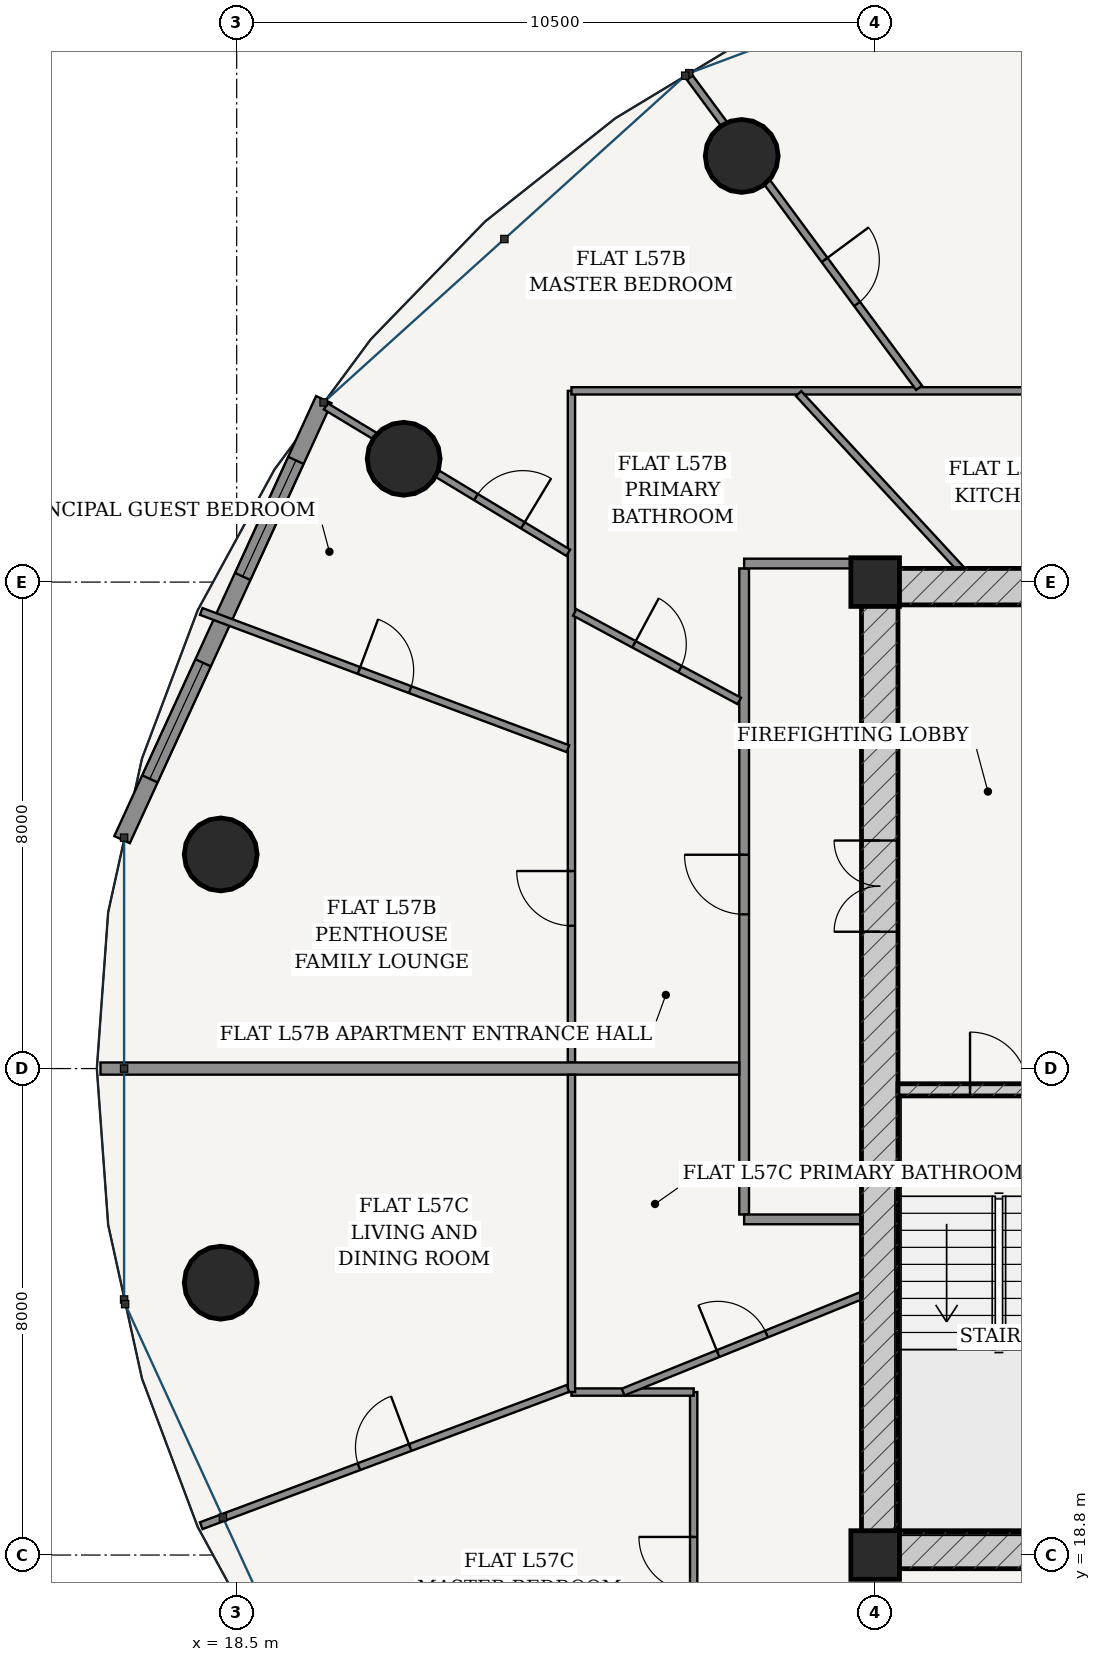
"""IFC4 building model, lengths in metres.
Left out: names, types, materials, properties, quantities, classifications, styles, units other than length and angle.
Written with IfcOpenShell. Run it as: python <this file> out.ifc"""

import sys

from ifc_helpers import new_model, si_unit, direction, frame, frame_2d, origin, origin_2d, place, context, subcontext, project, spatial, rectangle, hollow_circle, extrude, source, transform, mapped, element, fill, save


model = new_model("IFC4")
c1 = context("Model", 3, precision=1e-05, world=origin(), true_north=direction((-0.2419218956, 0.970295726276)))
c2 = subcontext(c1, "Body", "Model", "MODEL_VIEW")
j1 = project(units=[si_unit("LENGTHUNIT", "METRE"), si_unit("PLANEANGLEUNIT", "RADIAN")], contexts=[c1])
p1 = place(None, origin())
s1 = spatial("IfcSite", under=j1, at=p1, CompositionType="ELEMENT")
p2 = place(p1, origin())
s2 = spatial("IfcBuilding", under=s1, at=p2, CompositionType="ELEMENT")
p3 = place(p2, frame((0.0, 0.0, 217.1)))
s3 = spatial("IfcBuildingStorey", under=s2, at=p3, CompositionType="ELEMENT", Elevation=217.1)
for number, where, z_axis, x_axis in (
    (1, (29.0, 18.8, 0.0), (0.0, 0.0, 1.0), (1.0, 0.0, 0.0)),
    (2, (29.0, 34.8, 0.0), (0.0, 0.0, 1.0), (1.0, 0.0, 0.0)),
):
    element("IfcColumn", number, at=place(p3, frame(where, z_axis=z_axis, x_axis=x_axis)), inside=s3, PredefinedType="COLUMN", context=c2, shape_type="SweptSolid", body=[
        extrude(rectangle(XDim=0.8, YDim=0.8, at=origin_2d()), origin(), (0.0, 0.0, 1.0), 3.7),
    ])
p4 = place(p3, frame((28.775, 18.875, 0.0), z_axis=(0.0, 0.0, 1.0), x_axis=(1.0, 0.0, 0.0)))
e3 = element("IfcWall", 3, at=p4, inside=s3, PredefinedType="SHEAR", context=c2, shape_type="SweptSolid", body=[
    extrude(rectangle(XDim=18.45, YDim=0.6, at=frame_2d((9.225, 0.0))), origin(), (0.0, 0.0, 1.0), 3.435),
])
p5 = place(p4, frame((7.46, 0.0, 0.0)))
e4 = element("IfcOpeningElement", 4, at=p5, cuts=e3, PredefinedType="OPENING", context=c2, shape_type="SweptSolid", body=[
    extrude(rectangle(XDim=0.85, YDim=2.1, at=frame_2d((0.425, 1.05))), frame((0.0, 0.31, 0.0), z_axis=(0.0, -1.0, 0.0), x_axis=(1.0, 0.0, 0.0)), (0.0, 0.0, 1.0), 0.62),
])
p6 = place(p4, frame((10.54, 0.0, 0.0)))
e5 = element("IfcOpeningElement", 5, at=p6, cuts=e3, PredefinedType="OPENING", context=c2, shape_type="SweptSolid", body=[
    extrude(rectangle(XDim=0.85, YDim=2.1, at=frame_2d((0.425, 1.05))), frame((0.0, 0.31, 0.0), z_axis=(0.0, -1.0, 0.0), x_axis=(1.0, 0.0, 0.0)), (0.0, 0.0, 1.0), 0.62),
])
p7 = place(p3, frame((28.775, 34.725, 0.0), z_axis=(0.0, 0.0, 1.0), x_axis=(1.0, 0.0, 0.0)))
e6 = element("IfcWall", 6, at=p7, inside=s3, PredefinedType="SHEAR", context=c2, shape_type="SweptSolid", body=[
    extrude(rectangle(XDim=18.45, YDim=0.6, at=frame_2d((9.225, 0.0))), origin(), (0.0, 0.0, 1.0), 3.435),
])
p8 = place(p3, frame((29.075, 19.175, 0.0), z_axis=(0.0, 0.0, 1.0), x_axis=(0.0, 1.0, 0.0)))
e7 = element("IfcWall", 7, at=p8, inside=s3, PredefinedType="SHEAR", context=c2, shape_type="SweptSolid", body=[
    extrude(rectangle(XDim=15.25, YDim=0.6, at=frame_2d((7.625, 0.0))), origin(), (0.0, 0.0, 1.0), 3.435),
])
p9 = place(p8, frame((9.875, 0.0, 0.0)))
e8 = element("IfcOpeningElement", 8, at=p9, cuts=e7, PredefinedType="OPENING", context=c2, shape_type="SweptSolid", body=[
    extrude(rectangle(XDim=1.5, YDim=2.2, at=frame_2d((0.75, 1.1))), frame((0.0, 0.31, 0.0), z_axis=(0.0, -1.0, 0.0), x_axis=(1.0, 0.0, 0.0)), (0.0, 0.0, 1.0), 0.62),
])
p10 = place(p3, frame((29.375, 26.45, 0.0), z_axis=(0.0, 0.0, 1.0), x_axis=(1.0, 0.0, 0.0)))
e9 = element("IfcWall", 9, at=p10, inside=s3, PredefinedType="SOLIDWALL", context=c2, shape_type="SweptSolid", body=[
    extrude(rectangle(XDim=3.32, YDim=0.2, at=frame_2d((1.66, 0.0))), origin(), (0.0, 0.0, 1.0), 3.435),
])
p11 = place(p10, frame((1.185, 0.0, 0.0)))
e10 = element("IfcOpeningElement", 10, at=p11, cuts=e9, PredefinedType="OPENING", context=c2, shape_type="SweptSolid", body=[
    extrude(rectangle(XDim=0.95, YDim=2.15, at=frame_2d((0.475, 1.075))), frame((0.0, 0.11, 0.0), z_axis=(0.0, -1.0, 0.0), x_axis=(1.0, 0.0, 0.0)), (0.0, 0.0, 1.0), 0.22),
])
for number, where, z_axis, x_axis in (
    (11, (26.805, 41.808, 0.0), (0.0, 0.0, 1.0), (1.0, 0.0, 0.0)),
    (12, (21.246, 36.828, 0.0), (0.0, 0.0, 1.0), (1.0, 0.0, 0.0)),
    (13, (18.237, 30.321, 0.0), (0.0, 0.0, 1.0), (1.0, 0.0, 0.0)),
    (14, (18.237, 23.279, 0.0), (0.0, 0.0, 1.0), (1.0, 0.0, 0.0)),
):
    element("IfcColumn", number, at=place(p3, frame(where, z_axis=z_axis, x_axis=x_axis)), inside=s3, PredefinedType="COLUMN", context=c2, shape_type="SweptSolid", body=[
        extrude(hollow_circle(Radius=0.6, WallThickness=0.038, at=origin_2d()), origin(), (0.0, 0.0, 1.0), 3.7),
    ])
p12 = place(p3, frame((19.932, 37.801, 0.0), z_axis=(0.0, 0.0, 1.0), x_axis=(-0.416717018135, -0.909036262641, 0.0)))
e15 = element("IfcWall", 15, at=p12, inside=s3, PredefinedType="SOLIDWALL", context=c2, shape_type="SweptSolid", body=[
    extrude(rectangle(XDim=7.96, YDim=0.28, at=frame_2d((3.98, 0.0))), origin(), (0.0, 0.0, 1.0), 3.435),
])
p13 = place(p12, frame((1.099, 0.0, 0.85)))
e16 = element("IfcOpeningElement", 16, at=p13, cuts=e15, PredefinedType="OPENING", context=c2, shape_type="SweptSolid", body=[
    extrude(rectangle(XDim=2.1, YDim=1.95, at=frame_2d((1.05, 0.975))), frame((0.0, 0.15, 0.0), z_axis=(0.0, -1.0, 0.0), x_axis=(1.0, 0.0, 0.0)), (0.0, 0.0, 1.0), 0.3),
])
p14 = place(p12, frame((4.761, 0.0, 0.85)))
e17 = element("IfcOpeningElement", 17, at=p14, cuts=e15, PredefinedType="OPENING", context=c2, shape_type="SweptSolid", body=[
    extrude(rectangle(XDim=2.1, YDim=1.95, at=frame_2d((1.05, 0.975))), frame((0.0, 0.15, 0.0), z_axis=(0.0, -1.0, 0.0), x_axis=(1.0, 0.0, 0.0)), (0.0, 0.0, 1.0), 0.3),
])
p15 = place(p3, frame((26.845, 24.4, 0.0), z_axis=(0.0, 0.0, 1.0), x_axis=(0.0, 1.0, 0.0)))
e18 = element("IfcWall", 18, at=p15, inside=s3, PredefinedType="PARTITIONING", context=c2, shape_type="SweptSolid", body=[
    extrude(rectangle(XDim=10.625, YDim=0.16, at=frame_2d((5.312, 0.0))), origin(), (0.0, 0.0, 1.0), 2.951),
])
p16 = place(p15, frame((4.936, 0.0, 0.0)))
e19 = element("IfcOpeningElement", 19, at=p16, cuts=e18, PredefinedType="OPENING", context=c2, shape_type="SweptSolid", body=[
    extrude(rectangle(XDim=0.98, YDim=2.2, at=frame_2d((0.49, 1.1))), frame((0.0, 0.09, 0.0), z_axis=(0.0, -1.0, 0.0), x_axis=(1.0, 0.0, 0.0)), (0.0, 0.0, 1.0), 0.18),
])
for number, where, z_axis, x_axis in (
    (20, (26.845, 35.105, 0.0), (0.0, 0.0, 1.0), (1.0, 0.0, 0.0)),
    (21, (26.845, 24.32, 0.0), (0.0, 0.0, 1.0), (1.0, 0.0, 0.0)),
):
    element("IfcWall", number, at=place(p3, frame(where, z_axis=z_axis, x_axis=x_axis)), inside=s3, PredefinedType="PARTITIONING", context=c2, shape_type="SweptSolid", body=[
        extrude(rectangle(XDim=1.93, YDim=0.16, at=frame_2d((0.965, 0.0))), origin(), (0.0, 0.0, 1.0), 3.435),
    ])
p17 = place(p3, frame((24.005, 26.902, 0.0), z_axis=(0.0, 0.0, 1.0), x_axis=(0.0, 1.0, 0.0)))
e22 = element("IfcWall", 22, at=p17, inside=s3, PredefinedType="PARTITIONING", context=c2, shape_type="SweptSolid", body=[
    extrude(rectangle(XDim=11.043, YDim=0.12, at=frame_2d((5.521, 0.0))), origin(), (0.0, 0.0, 1.0), 2.951),
])
p18 = place(p17, frame((2.246, 0.0, 0.0)))
e23 = element("IfcOpeningElement", 23, at=p18, cuts=e22, PredefinedType="OPENING", context=c2, shape_type="SweptSolid", body=[
    extrude(rectangle(XDim=0.9, YDim=2.15, at=frame_2d((0.45, 1.075))), frame((0.0, 0.07, 0.0), z_axis=(0.0, -1.0, 0.0), x_axis=(1.0, 0.0, 0.0)), (0.0, 0.0, 1.0), 0.14),
])
p19 = place(p3, frame((24.005, 37.945, 0.0), z_axis=(0.0, 0.0, 1.0), x_axis=(1.0, 0.0, 0.0)))
e24 = element("IfcWall", 24, at=p19, inside=s3, PredefinedType="PARTITIONING", context=c2, shape_type="SweptSolid", body=[
    extrude(rectangle(XDim=7.69, YDim=0.12, at=frame_2d((3.845, 0.0))), origin(), (0.0, 0.0, 1.0), 2.951),
])
p20 = place(p3, frame((29.722, 37.995, 0.0), z_axis=(0.0, 0.0, 1.0), x_axis=(-0.594518724985, 0.80408176552, 0.0)))
e25 = element("IfcWall", 25, at=p20, inside=s3, PredefinedType="PARTITIONING", context=c2, shape_type="SweptSolid", body=[
    extrude(rectangle(XDim=6.344, YDim=0.12, at=frame_2d((3.172, 0.0))), origin(), (0.0, 0.0, 1.0), 2.951),
])
p21 = place(p20, frame((1.715, 0.0, 0.0)))
e26 = element("IfcOpeningElement", 26, at=p21, cuts=e25, PredefinedType="OPENING", context=c2, shape_type="SweptSolid", body=[
    extrude(rectangle(XDim=0.9, YDim=2.15, at=frame_2d((0.45, 1.075))), frame((0.0, 0.07, 0.0), z_axis=(0.0, -1.0, 0.0), x_axis=(1.0, 0.0, 0.0)), (0.0, 0.0, 1.0), 0.14),
])
p22 = place(p3, frame((23.952, 35.282, 0.0), z_axis=(0.0, 0.0, 1.0), x_axis=(-0.856051317976, 0.516890840499, 0.0)))
e27 = element("IfcWall", 27, at=p22, inside=s3, PredefinedType="PARTITIONING", context=c2, shape_type="SweptSolid", body=[
    extrude(rectangle(XDim=4.658, YDim=0.12, at=frame_2d((2.329, 0.0))), origin(), (0.0, 0.0, 1.0), 2.951),
])
p23 = place(p22, frame((0.872, 0.0, 0.0)))
e28 = element("IfcOpeningElement", 28, at=p23, cuts=e27, PredefinedType="OPENING", context=c2, shape_type="SweptSolid", body=[
    extrude(rectangle(XDim=0.9, YDim=2.15, at=frame_2d((0.45, 1.075))), frame((0.0, 0.07, 0.0), z_axis=(0.0, -1.0, 0.0), x_axis=(1.0, 0.0, 0.0)), (0.0, 0.0, 1.0), 0.14),
])
p24 = place(p3, frame((23.947, 32.06, 0.0), z_axis=(0.0, 0.0, 1.0), x_axis=(-0.936547148815, 0.350541635255, 0.0)))
e29 = element("IfcWall", 29, at=p24, inside=s3, PredefinedType="PARTITIONING", context=c2, shape_type="SweptSolid", body=[
    extrude(rectangle(XDim=6.439, YDim=0.12, at=frame_2d((3.219, 0.0))), origin(), (0.0, 0.0, 1.0), 2.951),
])
p25 = place(p24, frame((2.769, 0.0, 0.0)))
e30 = element("IfcOpeningElement", 30, at=p25, cuts=e29, PredefinedType="OPENING", context=c2, shape_type="SweptSolid", body=[
    extrude(rectangle(XDim=0.9, YDim=2.15, at=frame_2d((0.45, 1.075))), frame((0.0, 0.07, 0.0), z_axis=(0.0, -1.0, 0.0), x_axis=(1.0, 0.0, 0.0)), (0.0, 0.0, 1.0), 0.14),
])
p26 = place(p3, frame((30.396, 35.026, 0.0), z_axis=(0.0, 0.0, 1.0), x_axis=(-0.678759446058, 0.734360684124, 0.0)))
e31 = element("IfcWall", 31, at=p26, inside=s3, PredefinedType="PARTITIONING", context=c2, shape_type="SweptSolid", body=[
    extrude(rectangle(XDim=3.912, YDim=0.12, at=frame_2d((1.956, 0.0))), origin(), (0.0, 0.0, 1.0), 2.951),
])
p27 = place(p3, frame((26.765, 32.845, 0.0), z_axis=(0.0, 0.0, 1.0), x_axis=(-0.88059355453, 0.473872336943, 0.0)))
e32 = element("IfcWall", 32, at=p27, inside=s3, PredefinedType="PARTITIONING", context=c2, shape_type="SweptSolid", body=[
    extrude(rectangle(XDim=3.072, YDim=0.12, at=frame_2d((1.536, 0.0))), origin(), (0.0, 0.0, 1.0), 3.11),
])
p28 = place(p27, frame((1.106, 0.0, 0.0)))
e33 = element("IfcOpeningElement", 33, at=p28, cuts=e32, PredefinedType="OPENING", context=c2, shape_type="SweptSolid", body=[
    extrude(rectangle(XDim=0.86, YDim=2.15, at=frame_2d((0.43, 1.075))), frame((0.0, 0.07, 0.0), z_axis=(0.0, -1.0, 0.0), x_axis=(1.0, 0.0, 0.0)), (0.0, 0.0, 1.0), 0.14),
])
p29 = place(p3, frame((26.765, 26.8, 0.0), z_axis=(0.0, 0.0, 1.0), x_axis=(-1.0, 0.0, 0.0)))
e34 = element("IfcWall", 34, at=p29, inside=s3, PredefinedType="PARTITIONING", context=c2, shape_type="SweptSolid", body=[
    extrude(rectangle(XDim=10.505, YDim=0.2, at=frame_2d((5.252, 0.0))), origin(), (0.0, 0.0, 1.0), 2.951),
])
p30 = place(p3, frame((26.015, 15.815, 0.0), z_axis=(0.0, 0.0, 1.0), x_axis=(0.0, 1.0, 0.0)))
e35 = element("IfcWall", 35, at=p30, inside=s3, PredefinedType="PARTITIONING", context=c2, shape_type="SweptSolid", body=[
    extrude(rectangle(XDim=5.665, YDim=0.12, at=frame_2d((2.833, 0.0))), origin(), (0.0, 0.0, 1.0), 2.951),
])
p31 = place(p30, frame((2.383, 0.0, 0.0)))
e36 = element("IfcOpeningElement", 36, at=p31, cuts=e35, PredefinedType="OPENING", context=c2, shape_type="SweptSolid", body=[
    extrude(rectangle(XDim=0.9, YDim=2.15, at=frame_2d((0.45, 1.075))), frame((0.0, 0.07, 0.0), z_axis=(0.0, -1.0, 0.0), x_axis=(1.0, 0.0, 0.0)), (0.0, 0.0, 1.0), 0.14),
])
p32 = place(p3, frame((26.015, 21.48, 0.0), z_axis=(0.0, 0.0, 1.0), x_axis=(-1.0, 0.0, 0.0)))
e37 = element("IfcWall", 37, at=p32, inside=s3, PredefinedType="PARTITIONING", context=c2, shape_type="SweptSolid", body=[
    extrude(rectangle(XDim=2.01, YDim=0.12, at=frame_2d((1.005, 0.0))), origin(), (0.0, 0.0, 1.0), 3.11),
])
p33 = place(p3, frame((24.005, 21.48, 0.0), z_axis=(0.0, 0.0, 1.0), x_axis=(0.0, 1.0, 0.0)))
e38 = element("IfcWall", 38, at=p33, inside=s3, PredefinedType="PARTITIONING", context=c2, shape_type="SweptSolid", body=[
    extrude(rectangle(XDim=5.218, YDim=0.12, at=frame_2d((2.609, 0.0))), origin(), (0.0, 0.0, 1.0), 2.951),
])
p34 = place(p3, frame((23.947, 21.54, 0.0), z_axis=(0.0, 0.0, 1.0), x_axis=(-0.936534700322, -0.350574892274, 0.0)))
e39 = element("IfcWall", 39, at=p34, inside=s3, PredefinedType="PARTITIONING", context=c2, shape_type="SweptSolid", body=[
    extrude(rectangle(XDim=6.439, YDim=0.12, at=frame_2d((3.219, 0.0))), origin(), (0.0, 0.0, 1.0), 2.951),
])
p35 = place(p34, frame((2.769, 0.0, 0.0)))
e40 = element("IfcOpeningElement", 40, at=p35, cuts=e39, PredefinedType="OPENING", context=c2, shape_type="SweptSolid", body=[
    extrude(rectangle(XDim=0.9, YDim=2.15, at=frame_2d((0.45, 1.075))), frame((0.0, 0.07, 0.0), z_axis=(0.0, -1.0, 0.0), x_axis=(1.0, 0.0, 0.0)), (0.0, 0.0, 1.0), 0.14),
])
p36 = place(p3, frame((28.775, 23.067, 0.0), z_axis=(0.0, 0.0, 1.0), x_axis=(-0.926976443277, -0.375119545757, 0.0)))
e41 = element("IfcWall", 41, at=p36, inside=s3, PredefinedType="PARTITIONING", context=c2, shape_type="SweptSolid", body=[
    extrude(rectangle(XDim=4.23, YDim=0.12, at=frame_2d((2.115, 0.0))), origin(), (0.0, 0.0, 1.0), 3.435),
])
p37 = place(p36, frame((1.685, 0.0, 0.0)))
e42 = element("IfcOpeningElement", 42, at=p37, cuts=e41, PredefinedType="OPENING", context=c2, shape_type="SweptSolid", body=[
    extrude(rectangle(XDim=0.86, YDim=2.15, at=frame_2d((0.43, 1.075))), frame((0.0, 0.07, 0.0), z_axis=(0.0, -1.0, 0.0), x_axis=(1.0, 0.0, 0.0)), (0.0, 0.0, 1.0), 0.14),
])
p38 = place(p3, frame((32.117, 18.575, 0.0), z_axis=(0.0, 0.0, 1.0), x_axis=(-0.581813438478, -0.813322274874, 0.0)))
e43 = element("IfcWall", 43, at=p38, inside=s3, PredefinedType="PARTITIONING", context=c2, shape_type="SweptSolid", body=[
    extrude(rectangle(XDim=3.331, YDim=0.12, at=frame_2d((1.666, 0.0))), origin(), (0.0, 0.0, 1.0), 3.435),
])
p39 = place(p38, frame((1.216, 0.0, 0.0)))
e44 = element("IfcOpeningElement", 44, at=p39, cuts=e43, PredefinedType="OPENING", context=c2, shape_type="SweptSolid", body=[
    extrude(rectangle(XDim=0.9, YDim=2.15, at=frame_2d((0.45, 1.075))), frame((0.0, 0.07, 0.0), z_axis=(0.0, -1.0, 0.0), x_axis=(1.0, 0.0, 0.0)), (0.0, 0.0, 1.0), 0.14),
])
m1 = source(origin(), c2, "Body", "SweptSolid", [
    extrude(rectangle(XDim=2.1, YDim=1.95, at=frame_2d((1.05, 0.975))), frame((0.0, 0.03, 0.0), z_axis=(0.0, -1.0, 0.0), x_axis=(1.0, 0.0, 0.0)), (0.0, 0.0, 1.0), 0.06),
])
p40 = place(p13, origin())
e45 = element("IfcWindow", 45, at=p40, inside=s3, PartitioningType="SINGLE_PANEL", PredefinedType="WINDOW", context=c2, shape_type="MappedRepresentation", body=[
    mapped(m1, transform((0.0, 0.0, 0.0), scale=1.0)),
])
fill(e16, e45)
p41 = place(p14, origin())
e46 = element("IfcWindow", 46, at=p41, inside=s3, PartitioningType="SINGLE_PANEL", PredefinedType="WINDOW", context=c2, shape_type="MappedRepresentation", body=[
    mapped(m1, transform((0.0, 0.0, 0.0), scale=1.0)),
])
fill(e17, e46)
m2 = source(origin(), c2, "Body", "SweptSolid", [
    extrude(rectangle(XDim=1.5, YDim=2.2, at=frame_2d((0.75, 1.1))), frame((0.0, 0.025, 0.0), z_axis=(0.0, -1.0, 0.0), x_axis=(1.0, 0.0, 0.0)), (0.0, 0.0, 1.0), 0.05),
])
p42 = place(p9, origin())
e47 = element("IfcDoor", 47, at=p42, inside=s3, OperationType="DOUBLE_DOOR_SINGLE_SWING", PredefinedType="DOOR", context=c2, shape_type="MappedRepresentation", body=[
    mapped(m2, transform((0.0, 0.0, 0.0), scale=1.0)),
])
fill(e8, e47)
m3 = source(origin(), c2, "Body", "SweptSolid", [
    extrude(rectangle(XDim=0.95, YDim=2.15, at=frame_2d((0.475, 1.075))), frame((0.0, 0.025, 0.0), z_axis=(0.0, -1.0, 0.0), x_axis=(1.0, 0.0, 0.0)), (0.0, 0.0, 1.0), 0.05),
])
p43 = place(p11, origin())
e48 = element("IfcDoor", 48, at=p43, inside=s3, OperationType="SINGLE_SWING_LEFT", PredefinedType="DOOR", context=c2, shape_type="MappedRepresentation", body=[
    mapped(m3, transform((0.0, 0.0, 0.0), scale=1.0)),
])
fill(e10, e48)
m4 = source(origin(), c2, "Body", "SweptSolid", [
    extrude(rectangle(XDim=0.98, YDim=2.2, at=frame_2d((0.49, 1.1))), frame((0.0, 0.025, 0.0), z_axis=(0.0, -1.0, 0.0), x_axis=(1.0, 0.0, 0.0)), (0.0, 0.0, 1.0), 0.05),
])
p44 = place(p16, origin())
e49 = element("IfcDoor", 49, at=p44, inside=s3, OperationType="SINGLE_SWING_RIGHT", PredefinedType="DOOR", context=c2, shape_type="MappedRepresentation", body=[
    mapped(m4, transform((0.0, 0.0, 0.0), scale=1.0)),
])
fill(e19, e49)
m5 = source(origin(), c2, "Body", "SweptSolid", [
    extrude(rectangle(XDim=0.86, YDim=2.15, at=frame_2d((0.43, 1.075))), frame((0.0, 0.025, 0.0), z_axis=(0.0, -1.0, 0.0), x_axis=(1.0, 0.0, 0.0)), (0.0, 0.0, 1.0), 0.05),
])
p45 = place(p28, frame((0.86, 0.0, 0.0), z_axis=(0.0, 0.0, 1.0), x_axis=(-1.0, 0.0, 0.0)))
e50 = element("IfcDoor", 50, at=p45, inside=s3, OperationType="SINGLE_SWING_LEFT", PredefinedType="DOOR", context=c2, shape_type="MappedRepresentation", body=[
    mapped(m5, transform((0.0, 0.0, 0.0), scale=1.0)),
])
fill(e33, e50)
m6 = source(origin(), c2, "Body", "SweptSolid", [
    extrude(rectangle(XDim=0.9, YDim=2.15, at=frame_2d((0.45, 1.075))), frame((0.0, 0.025, 0.0), z_axis=(0.0, -1.0, 0.0), x_axis=(1.0, 0.0, 0.0)), (0.0, 0.0, 1.0), 0.05),
])
p46 = place(p18, origin())
e51 = element("IfcDoor", 51, at=p46, inside=s3, OperationType="SINGLE_SWING_RIGHT", PredefinedType="DOOR", context=c2, shape_type="MappedRepresentation", body=[
    mapped(m6, transform((0.0, 0.0, 0.0), scale=1.0)),
])
fill(e23, e51)
p47 = place(p25, frame((0.9, 0.0, 0.0), z_axis=(0.0, 0.0, 1.0), x_axis=(-1.0, 0.0, 0.0)))
e52 = element("IfcDoor", 52, at=p47, inside=s3, OperationType="SINGLE_SWING_LEFT", PredefinedType="DOOR", context=c2, shape_type="MappedRepresentation", body=[
    mapped(m6, transform((0.0, 0.0, 0.0), scale=1.0)),
])
fill(e30, e52)
p48 = place(p23, frame((0.9, 0.0, 0.0), z_axis=(0.0, 0.0, 1.0), x_axis=(-1.0, 0.0, 0.0)))
e53 = element("IfcDoor", 53, at=p48, inside=s3, OperationType="SINGLE_SWING_RIGHT", PredefinedType="DOOR", context=c2, shape_type="MappedRepresentation", body=[
    mapped(m6, transform((0.0, 0.0, 0.0), scale=1.0)),
])
fill(e28, e53)
p49 = place(p21, frame((0.9, 0.0, 0.0), z_axis=(0.0, 0.0, 1.0), x_axis=(-1.0, 0.0, 0.0)))
e54 = element("IfcDoor", 54, at=p49, inside=s3, OperationType="SINGLE_SWING_LEFT", PredefinedType="DOOR", context=c2, shape_type="MappedRepresentation", body=[
    mapped(m6, transform((0.0, 0.0, 0.0), scale=1.0)),
])
fill(e26, e54)
p50 = place(p31, origin())
e55 = element("IfcDoor", 55, at=p50, inside=s3, OperationType="SINGLE_SWING_RIGHT", PredefinedType="DOOR", context=c2, shape_type="MappedRepresentation", body=[
    mapped(m6, transform((0.0, 0.0, 0.0), scale=1.0)),
])
fill(e36, e55)
p51 = place(p37, frame((0.86, 0.0, 0.0), z_axis=(0.0, 0.0, 1.0), x_axis=(-1.0, 0.0, 0.0)))
e56 = element("IfcDoor", 56, at=p51, inside=s3, OperationType="SINGLE_SWING_LEFT", PredefinedType="DOOR", context=c2, shape_type="MappedRepresentation", body=[
    mapped(m5, transform((0.0, 0.0, 0.0), scale=1.0)),
])
fill(e42, e56)
p52 = place(p35, frame((0.9, 0.0, 0.0), z_axis=(0.0, 0.0, 1.0), x_axis=(-1.0, 0.0, 0.0)))
e57 = element("IfcDoor", 57, at=p52, inside=s3, OperationType="SINGLE_SWING_RIGHT", PredefinedType="DOOR", context=c2, shape_type="MappedRepresentation", body=[
    mapped(m6, transform((0.0, 0.0, 0.0), scale=1.0)),
])
fill(e40, e57)
save(model, sys.argv[1])
